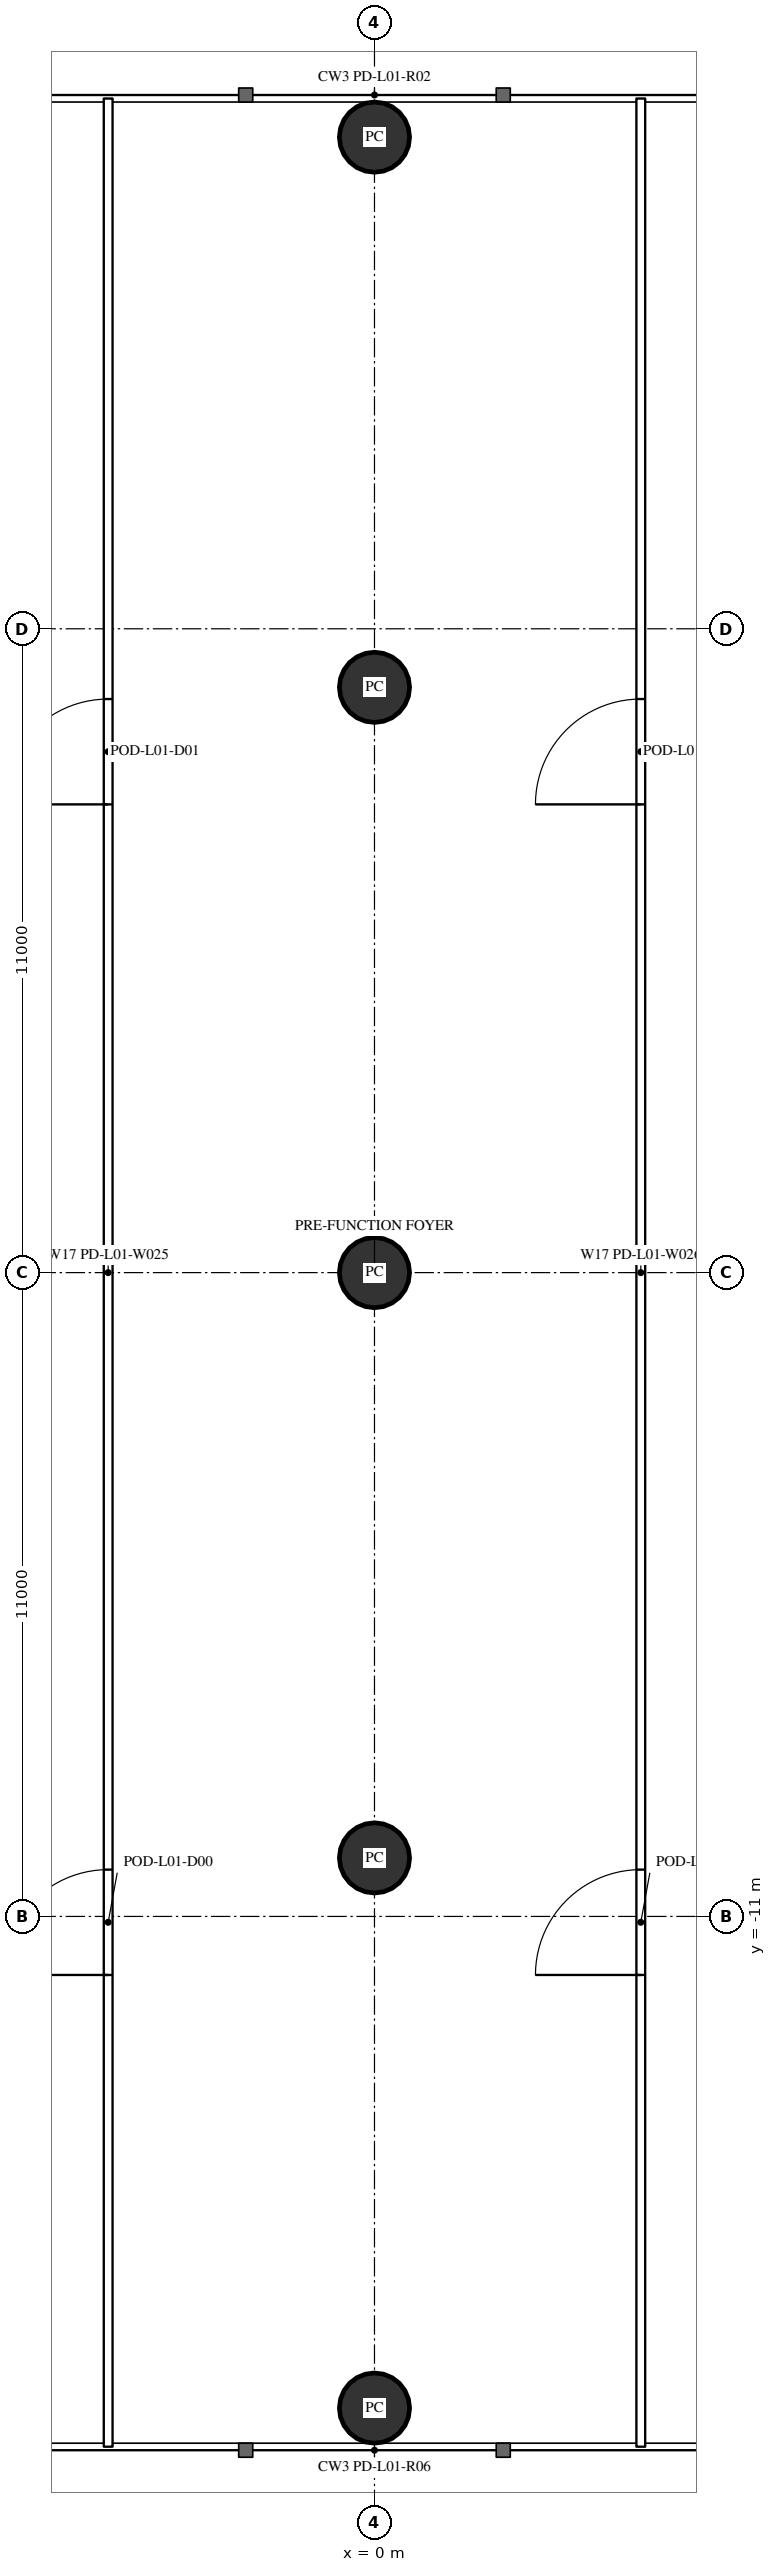
"""IFC4 building model, lengths in metres.
Left out: names, types, materials, properties, quantities, classifications, styles, units other than length and angle.
Written with IfcOpenShell. Run it as: python <this file> out.ifc"""

import sys

from ifc_helpers import new_model, si_unit, direction, frame, frame_2d, origin, origin_2d, place, context, subcontext, project, spatial, rectangle, circle, extrude, element, fill, save


model = new_model("IFC4")
c1 = context("Model", 3, precision=1e-05, world=origin(), true_north=direction((0.0, 1.0)))
c2 = subcontext(c1, "Body", "Model", "MODEL_VIEW")
j1 = project(units=[si_unit("LENGTHUNIT", "METRE"), si_unit("PLANEANGLEUNIT", "RADIAN")], contexts=[c1])
p1 = place(None, origin())
s1 = spatial("IfcSite", under=j1, at=p1, CompositionType="ELEMENT")
p2 = place(p1, origin())
s2 = spatial("IfcBuilding", under=s1, at=p2, CompositionType="ELEMENT")
p3 = place(p2, frame((0.0, 0.0, 7.2)))
s3 = spatial("IfcBuildingStorey", under=s2, at=p3, CompositionType="ELEMENT", Elevation=7.2)
for number, where, z_axis, x_axis in (
    (1, (0.0, -19.4, 0.0), (0.0, 0.0, 1.0), (1.0, 0.0, 0.0)),
    (2, (0.0, -10.0, 0.0), (0.0, 0.0, 1.0), (1.0, 0.0, 0.0)),
    (3, (0.0, 0.0, 0.0), (0.0, 0.0, 1.0), (1.0, 0.0, 0.0)),
    (4, (0.0, 10.0, 0.0), (0.0, 0.0, 1.0), (1.0, 0.0, 0.0)),
    (5, (0.0, 19.4, 0.0), (0.0, 0.0, 1.0), (1.0, 0.0, 0.0)),
):
    element("IfcColumn", number, at=place(p3, frame(where, z_axis=z_axis, x_axis=x_axis)), inside=s3, PredefinedType="COLUMN", context=c2, shape_type="SweptSolid", body=[
        extrude(circle(Radius=0.6, at=origin_2d()), origin(), (0.0, 0.0, 1.0), 5.4),
    ])
p4 = place(p3, frame((-4.55, -20.06, 0.0), z_axis=(0.0, 0.0, 1.0), x_axis=(0.0, 1.0, 0.0)))
e6 = element("IfcWall", 6, at=p4, inside=s3, PredefinedType="PARTITIONING", context=c2, shape_type="SweptSolid", body=[
    extrude(rectangle(XDim=40.12, YDim=0.15, at=frame_2d((20.06, 0.0))), origin(), (0.0, 0.0, 1.0), 4.05),
])
p5 = place(p4, frame((8.06, 0.0, 0.0)))
e7 = element("IfcOpeningElement", 7, at=p5, cuts=e6, PredefinedType="OPENING", context=c2, shape_type="SweptSolid", body=[
    extrude(rectangle(XDim=1.8, YDim=2.2, at=frame_2d((0.9, 1.1))), frame((0.0, 0.085, 0.0), z_axis=(0.0, -1.0, 0.0), x_axis=(1.0, 0.0, 0.0)), (0.0, 0.0, 1.0), 0.17),
])
p6 = place(p4, frame((28.06, 0.0, 0.0)))
e8 = element("IfcOpeningElement", 8, at=p6, cuts=e6, PredefinedType="OPENING", context=c2, shape_type="SweptSolid", body=[
    extrude(rectangle(XDim=1.8, YDim=2.2, at=frame_2d((0.9, 1.1))), frame((0.0, 0.085, 0.0), z_axis=(0.0, -1.0, 0.0), x_axis=(1.0, 0.0, 0.0)), (0.0, 0.0, 1.0), 0.17),
])
p7 = place(p3, frame((4.55, -20.06, 0.0), z_axis=(0.0, 0.0, 1.0), x_axis=(0.0, 1.0, 0.0)))
e9 = element("IfcWall", 9, at=p7, inside=s3, PredefinedType="PARTITIONING", context=c2, shape_type="SweptSolid", body=[
    extrude(rectangle(XDim=40.12, YDim=0.15, at=frame_2d((20.06, 0.0))), origin(), (0.0, 0.0, 1.0), 4.05),
])
p8 = place(p7, frame((8.06, 0.0, 0.0)))
e10 = element("IfcOpeningElement", 10, at=p8, cuts=e9, PredefinedType="OPENING", context=c2, shape_type="SweptSolid", body=[
    extrude(rectangle(XDim=1.8, YDim=2.2, at=frame_2d((0.9, 1.1))), frame((0.0, 0.085, 0.0), z_axis=(0.0, -1.0, 0.0), x_axis=(1.0, 0.0, 0.0)), (0.0, 0.0, 1.0), 0.17),
])
p9 = place(p7, frame((28.06, 0.0, 0.0)))
e11 = element("IfcOpeningElement", 11, at=p9, cuts=e9, PredefinedType="OPENING", context=c2, shape_type="SweptSolid", body=[
    extrude(rectangle(XDim=1.8, YDim=2.2, at=frame_2d((0.9, 1.1))), frame((0.0, 0.085, 0.0), z_axis=(0.0, -1.0, 0.0), x_axis=(1.0, 0.0, 0.0)), (0.0, 0.0, 1.0), 0.17),
])
p10 = place(p5, origin())
e12 = element("IfcDoor", 12, at=p10, inside=s3, OperationType="DOUBLE_DOOR_SINGLE_SWING", PredefinedType="DOOR", context=c2, shape_type="SweptSolid", body=[
    extrude(rectangle(XDim=1.8, YDim=2.2, at=frame_2d((0.9, 1.1))), frame((0.0, 0.025, 0.0), z_axis=(0.0, -1.0, 0.0), x_axis=(1.0, 0.0, 0.0)), (0.0, 0.0, 1.0), 0.05),
])
fill(e7, e12)
p11 = place(p6, origin())
e13 = element("IfcDoor", 13, at=p11, inside=s3, OperationType="DOUBLE_DOOR_SINGLE_SWING", PredefinedType="DOOR", context=c2, shape_type="SweptSolid", body=[
    extrude(rectangle(XDim=1.8, YDim=2.2, at=frame_2d((0.9, 1.1))), frame((0.0, 0.025, 0.0), z_axis=(0.0, -1.0, 0.0), x_axis=(1.0, 0.0, 0.0)), (0.0, 0.0, 1.0), 0.05),
])
fill(e8, e13)
p12 = place(p8, origin())
e14 = element("IfcDoor", 14, at=p12, inside=s3, OperationType="DOUBLE_DOOR_SINGLE_SWING", PredefinedType="DOOR", context=c2, shape_type="SweptSolid", body=[
    extrude(rectangle(XDim=1.8, YDim=2.2, at=frame_2d((0.9, 1.1))), frame((0.0, 0.025, 0.0), z_axis=(0.0, -1.0, 0.0), x_axis=(1.0, 0.0, 0.0)), (0.0, 0.0, 1.0), 0.05),
])
fill(e10, e14)
p13 = place(p9, origin())
e15 = element("IfcDoor", 15, at=p13, inside=s3, OperationType="DOUBLE_DOOR_SINGLE_SWING", PredefinedType="DOOR", context=c2, shape_type="SweptSolid", body=[
    extrude(rectangle(XDim=1.8, YDim=2.2, at=frame_2d((0.9, 1.1))), frame((0.0, 0.025, 0.0), z_axis=(0.0, -1.0, 0.0), x_axis=(1.0, 0.0, 0.0)), (0.0, 0.0, 1.0), 0.05),
])
fill(e11, e15)
save(model, sys.argv[1])
